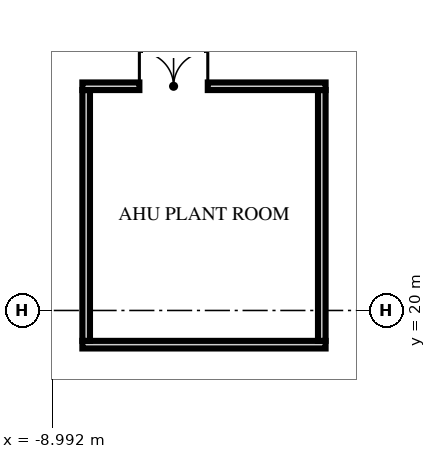
"""IFC4 building model, lengths in metres.
Left out: names, types, materials, properties, quantities, classifications, styles, units other than length and angle.
Written with IfcOpenShell. Run it as: python <this file> out.ifc"""

import sys

from ifc_helpers import new_model, si_unit, direction, frame, frame_2d, origin, origin_2d, place, context, subcontext, project, spatial, rectangle, hollow_rectangle, extrude, element, fill, save


model = new_model("IFC4")
c1 = context("Model", 3, precision=1e-05, world=origin(), true_north=direction((0.0, 1.0)))
c2 = subcontext(c1, "Body", "Model", "MODEL_VIEW")
j1 = project(units=[si_unit("LENGTHUNIT", "METRE"), si_unit("PLANEANGLEUNIT", "RADIAN")], contexts=[c1])
p1 = place(None, origin())
s1 = spatial("IfcSite", under=j1, at=p1, CompositionType="ELEMENT")
p2 = place(p1, origin())
s2 = spatial("IfcBuilding", under=s1, at=p2, CompositionType="ELEMENT")
p3 = place(p2, frame((0.0, 0.0, 99.75)))
s3 = spatial("IfcBuildingStorey", under=s2, at=p3, CompositionType="ELEMENT", Elevation=99.75)
p4 = place(p3, frame((-10.0, 29.8, -0.65), z_axis=(0.103601510687, -0.332963994967, 0.937230870724), x_axis=(0.994618884766, 0.034712905596, -0.097612951251)))
e1 = element("IfcColumn", 1, at=p4, inside=s3, PredefinedType="COLUMN", context=c2, shape_type="SweptSolid", body=[
    extrude(hollow_rectangle(XDim=3.2, YDim=1.8, WallThickness=0.2, at=origin_2d()), origin(), (0.0, 0.0, 1.0), 8.109),
])
p5 = place(p3, frame((0.0, 29.8, -0.65), z_axis=(0.0, -0.334765406017, 0.942301503201), x_axis=(1.0, 0.0, 0.0)))
e2 = element("IfcColumn", 2, at=p5, inside=s3, PredefinedType="COLUMN", context=c2, shape_type="SweptSolid", body=[
    extrude(hollow_rectangle(XDim=3.2, YDim=1.8, WallThickness=0.2, at=origin_2d()), origin(), (0.0, 0.0, 1.0), 8.065),
])
p6 = place(p3, frame((-8.2, 19.1, 0.0), z_axis=(0.0, 0.0, 1.0), x_axis=(1.0, 0.0, 0.0)))
e3 = element("IfcWall", 3, at=p6, inside=s3, PredefinedType="SOLIDWALL", context=c2, shape_type="SweptSolid", body=[
    extrude(rectangle(XDim=6.4, YDim=0.2, at=frame_2d((3.2, 0.0))), origin(), (0.0, 0.0, 1.0), 6.46),
])
for number, where, z_axis, x_axis in (
    (4, (-8.1, 19.2, 0.0), (0.0, 0.0, 1.0), (0.0, 1.0, 0.0)),
    (5, (-1.9, 19.2, 0.0), (0.0, 0.0, 1.0), (0.0, 1.0, 0.0)),
):
    element("IfcWall", number, at=place(p3, frame(where, z_axis=z_axis, x_axis=x_axis)), inside=s3, PredefinedType="SOLIDWALL", context=c2, shape_type="SweptSolid", body=[
        extrude(rectangle(XDim=6.6, YDim=0.2, at=frame_2d((3.3, 0.0))), origin(), (0.0, 0.0, 1.0), 7.25),
    ])
p7 = place(p3, frame((-8.2, 25.9, 0.0), z_axis=(0.0, 0.0, 1.0), x_axis=(1.0, 0.0, 0.0)))
e6 = element("IfcWall", 6, at=p7, inside=s3, PredefinedType="SOLIDWALL", context=c2, shape_type="SweptSolid", body=[
    extrude(rectangle(XDim=6.4, YDim=0.2, at=frame_2d((3.2, 0.0))), origin(), (0.0, 0.0, 1.0), 6.46),
])
p8 = place(p7, frame((1.5, 0.0, 0.0)))
e7 = element("IfcOpeningElement", 7, at=p8, cuts=e6, PredefinedType="OPENING", context=c2, shape_type="SweptSolid", body=[
    extrude(rectangle(XDim=1.8, YDim=2.4, at=frame_2d((0.9, 1.2))), frame((0.0, 0.11, 0.0), z_axis=(0.0, -1.0, 0.0), x_axis=(1.0, 0.0, 0.0)), (0.0, 0.0, 1.0), 0.22),
])
p9 = place(p8, origin())
e8 = element("IfcDoor", 8, at=p9, inside=s3, OperationType="DOUBLE_DOOR_SINGLE_SWING", PredefinedType="DOOR", context=c2, shape_type="SweptSolid", body=[
    extrude(rectangle(XDim=1.8, YDim=2.4, at=frame_2d((0.9, 1.2))), frame((0.0, 0.025, 0.0), z_axis=(0.0, -1.0, 0.0), x_axis=(1.0, 0.0, 0.0)), (0.0, 0.0, 1.0), 0.05),
])
fill(e7, e8)
save(model, sys.argv[1])
